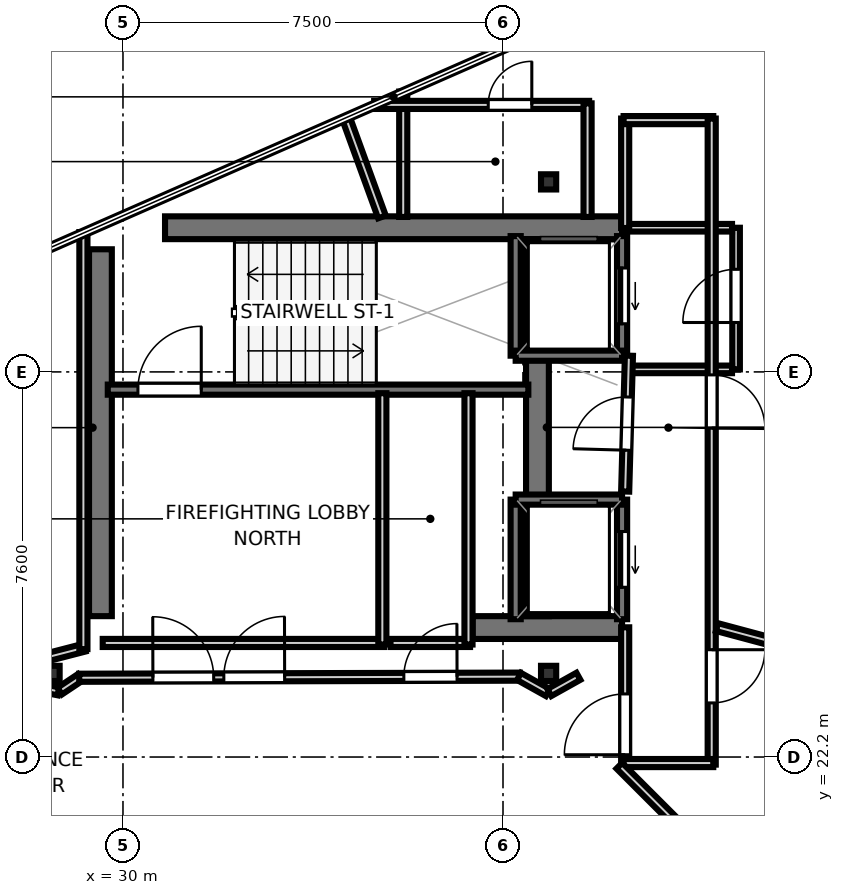
"""IFC4 building model, lengths in metres.
Left out: names, types, materials, properties, quantities, classifications, styles, units other than length and angle.
Written with IfcOpenShell. Run it as: python <this file> out.ifc"""

import sys

from ifc_helpers import new_model, si_unit, direction, frame, frame_2d, origin, origin_2d, place, context, subcontext, project, spatial, rectangle, i_section, extrude, element, fill, save


model = new_model("IFC4")
c1 = context("Model", 3, precision=1e-05, world=origin(), true_north=direction((0.0, 1.0)))
c2 = subcontext(c1, "Body", "Model", "MODEL_VIEW")
j1 = project(units=[si_unit("LENGTHUNIT", "METRE"), si_unit("PLANEANGLEUNIT", "RADIAN")], contexts=[c1])
p1 = place(None, origin())
s1 = spatial("IfcSite", under=j1, at=p1, CompositionType="ELEMENT")
p2 = place(p1, origin())
s2 = spatial("IfcBuilding", under=s1, at=p2, CompositionType="ELEMENT")
p3 = place(p2, frame((0.0, 0.0, 371.3)))
s3 = spatial("IfcBuildingStorey", under=s2, at=p3, CompositionType="ELEMENT", Elevation=371.3)
p4 = place(p3, frame((30.83, 32.645, 0.0), z_axis=(0.0, 0.0, 1.0), x_axis=(1.0, 0.0, 0.0)))
e1 = element("IfcWall", 1, at=p4, inside=s3, PredefinedType="SHEAR", context=c2, shape_type="SweptSolid", body=[
    extrude(rectangle(XDim=9.02, YDim=0.45, at=frame_2d((4.51, 0.0))), origin(), (0.0, 0.0, 1.0), 3.55),
])
p5 = place(p3, frame((36.9, 24.755, 0.0), z_axis=(0.0, 0.0, 1.0), x_axis=(1.0, 0.0, 0.0)))
e2 = element("IfcWall", 2, at=p5, inside=s3, PredefinedType="SHEAR", context=c2, shape_type="SweptSolid", body=[
    extrude(rectangle(XDim=2.95, YDim=0.45, at=frame_2d((1.475, 0.0))), origin(), (0.0, 0.0, 1.0), 3.55),
])
p6 = place(p3, frame((29.555, 24.98, 0.0), z_axis=(0.0, 0.0, 1.0), x_axis=(0.0, 1.0, 0.0)))
e3 = element("IfcWall", 3, at=p6, inside=s3, PredefinedType="SHEAR", context=c2, shape_type="SweptSolid", body=[
    extrude(rectangle(XDim=7.24, YDim=0.45, at=frame_2d((3.62, 0.0))), origin(), (0.0, 0.0, 1.0), 3.55),
])
p7 = place(p3, frame((38.18, 24.98, 0.0), z_axis=(0.0, 0.0, 1.0), x_axis=(0.0, 1.0, 0.0)))
e4 = element("IfcWall", 4, at=p7, inside=s3, PredefinedType="SHEAR", context=c2, shape_type="SweptSolid", body=[
    extrude(rectangle(XDim=7.44, YDim=0.45, at=frame_2d((3.72, 0.0))), origin(), (0.0, 0.0, 1.0), 3.55),
])
for number, where, z_axis, x_axis in (
    (5, (28.6, 23.85, 0.0), (0.0, 0.0, 1.0), (1.0, 0.0, 0.0)),
    (6, (38.4, 33.55, 0.0), (0.0, 0.0, 1.0), (1.0, 0.0, 0.0)),
    (7, (38.4, 23.85, 0.0), (0.0, 0.0, 1.0), (1.0, 0.0, 0.0)),
):
    element("IfcColumn", number, at=place(p3, frame(where, z_axis=z_axis, x_axis=x_axis)), inside=s3, PredefinedType="COLUMN", context=c2, shape_type="SweptSolid", body=[
        extrude(i_section(OverallWidth=0.3, OverallDepth=0.3, WebThickness=0.01, FlangeThickness=0.015, at=origin_2d()), origin(), (0.0, 0.0, 1.0), 3.75),
    ])
p8 = place(p3, frame((29.7, 29.45, 0.0), z_axis=(0.0, 0.0, 1.0), x_axis=(1.0, 0.0, 0.0)))
e8 = element("IfcWall", 8, at=p8, inside=s3, PredefinedType="SOLIDWALL", context=c2, shape_type="SweptSolid", body=[
    extrude(rectangle(XDim=8.3, YDim=0.2, at=frame_2d((4.15, 0.0))), origin(), (0.0, 0.0, 1.0), 3.55),
])
p9 = place(p8, frame((0.595, 0.0, 0.0)))
e9 = element("IfcOpeningElement", 9, at=p9, cuts=e8, PredefinedType="OPENING", context=c2, shape_type="SweptSolid", body=[
    extrude(rectangle(XDim=1.25, YDim=2.15, at=frame_2d((0.625, 1.075))), frame((0.0, 0.11, 0.0), z_axis=(0.0, -1.0, 0.0), x_axis=(1.0, 0.0, 0.0)), (0.0, 0.0, 1.0), 0.22),
])
p10 = place(p3, frame((39.85, 30.12, 0.0), z_axis=(0.0, 0.0, 1.0), x_axis=(0.0, 1.0, 0.0)))
e10 = element("IfcWall", 10, at=p10, inside=s3, PredefinedType="SOLIDWALL", context=c2, shape_type="SweptSolid", body=[
    extrude(rectangle(XDim=2.36, YDim=0.2, at=frame_2d((1.18, 0.0))), origin(), (0.0, 0.0, 1.0), 3.55),
])
p11 = place(p10, frame((0.63, 0.0, 0.0)))
e11 = element("IfcOpeningElement", 11, at=p11, cuts=e10, PredefinedType="OPENING", context=c2, shape_type="SweptSolid", body=[
    extrude(rectangle(XDim=1.1, YDim=2.15, at=frame_2d((0.55, 1.075))), frame((0.0, 0.11, 0.0), z_axis=(0.0, -1.0, 0.0), x_axis=(1.0, 0.0, 0.0)), (0.0, 0.0, 1.0), 0.22),
])
p12 = place(p3, frame((37.75, 30.12, 0.0), z_axis=(0.0, 0.0, 1.0), x_axis=(0.0, 1.0, 0.0)))
e12 = element("IfcWall", 12, at=p12, inside=s3, PredefinedType="SOLIDWALL", context=c2, shape_type="SweptSolid", body=[
    extrude(rectangle(XDim=2.36, YDim=0.2, at=frame_2d((1.18, 0.0))), origin(), (0.0, 0.0, 1.0), 3.55),
])
p13 = place(p3, frame((37.75, 30.12, 0.0), z_axis=(0.0, 0.0, 1.0), x_axis=(1.0, 0.0, 0.0)))
e13 = element("IfcWall", 13, at=p13, inside=s3, PredefinedType="SOLIDWALL", context=c2, shape_type="SweptSolid", body=[
    extrude(rectangle(XDim=2.1, YDim=0.2, at=frame_2d((1.05, 0.0))), origin(), (0.0, 0.0, 1.0), 3.55),
])
p14 = place(p3, frame((39.85, 24.92, 0.0), z_axis=(0.0, 0.0, 1.0), x_axis=(0.0, 1.0, 0.0)))
e14 = element("IfcWall", 14, at=p14, inside=s3, PredefinedType="SOLIDWALL", context=c2, shape_type="SweptSolid", body=[
    extrude(rectangle(XDim=2.36, YDim=0.2, at=frame_2d((1.18, 0.0))), origin(), (0.0, 0.0, 1.0), 3.55),
])
p15 = place(p14, frame((0.63, 0.0, 0.0)))
e15 = element("IfcOpeningElement", 15, at=p15, cuts=e14, PredefinedType="OPENING", context=c2, shape_type="SweptSolid", body=[
    extrude(rectangle(XDim=1.1, YDim=2.15, at=frame_2d((0.55, 1.075))), frame((0.0, 0.11, 0.0), z_axis=(0.0, -1.0, 0.0), x_axis=(1.0, 0.0, 0.0)), (0.0, 0.0, 1.0), 0.22),
])
p16 = place(p3, frame((37.75, 24.92, 0.0), z_axis=(0.0, 0.0, 1.0), x_axis=(0.0, 1.0, 0.0)))
e16 = element("IfcWall", 16, at=p16, inside=s3, PredefinedType="SOLIDWALL", context=c2, shape_type="SweptSolid", body=[
    extrude(rectangle(XDim=2.36, YDim=0.2, at=frame_2d((1.18, 0.0))), origin(), (0.0, 0.0, 1.0), 3.55),
])
p17 = place(p3, frame((37.75, 27.28, 0.0), z_axis=(0.0, 0.0, 1.0), x_axis=(1.0, 0.0, 0.0)))
e17 = element("IfcWall", 17, at=p17, inside=s3, PredefinedType="SOLIDWALL", context=c2, shape_type="SweptSolid", body=[
    extrude(rectangle(XDim=2.1, YDim=0.2, at=frame_2d((1.05, 0.0))), origin(), (0.0, 0.0, 1.0), 3.55),
])
p18 = place(p3, frame((42.1, 29.85, 0.0), z_axis=(0.0, 0.0, 1.0), x_axis=(0.0, 1.0, 0.0)))
e18 = element("IfcWall", 18, at=p18, inside=s3, PredefinedType="PARTITIONING", context=c2, shape_type="SweptSolid", body=[
    extrude(rectangle(XDim=2.795, YDim=0.15, at=frame_2d((1.397, 0.0))), origin(), (0.0, 0.0, 1.0), 2.87),
])
p19 = place(p18, frame((0.925, 0.0, 0.0)))
e19 = element("IfcOpeningElement", 19, at=p19, cuts=e18, PredefinedType="OPENING", context=c2, shape_type="SweptSolid", body=[
    extrude(rectangle(XDim=1.05, YDim=2.15, at=frame_2d((0.525, 1.075))), frame((0.0, 0.085, 0.0), z_axis=(0.0, -1.0, 0.0), x_axis=(1.0, 0.0, 0.0)), (0.0, 0.0, 1.0), 0.17),
])
for number, where, z_axis, x_axis in (
    (20, (39.96, 29.85, 0.0), (0.0, 0.0, 1.0), (1.0, 0.0, 0.0)),
    (21, (39.96, 32.645, 0.0), (0.0, 0.0, 1.0), (1.0, 0.0, 0.0)),
):
    element("IfcWall", number, at=place(p3, frame(where, z_axis=z_axis, x_axis=x_axis)), inside=s3, PredefinedType="PARTITIONING", context=c2, shape_type="SweptSolid", body=[
        extrude(rectangle(XDim=2.06, YDim=0.15, at=frame_2d((1.03, 0.0))), origin(), (0.0, 0.0, 1.0), 2.87),
    ])
p20 = place(p3, frame((35.15, 24.451, 0.0), z_axis=(0.0, 0.0, 1.0), x_axis=(-1.0, 0.0, 0.0)))
e22 = element("IfcWall", 22, at=p20, inside=s3, PredefinedType="PARTITIONING", context=c2, shape_type="SweptSolid", body=[
    extrude(rectangle(XDim=5.55, YDim=0.16, at=frame_2d((2.775, 0.0))), origin(), (0.0, 0.0, 1.0), 2.87),
])
p21 = place(p3, frame((35.119, 29.38, 0.0), z_axis=(0.0, 0.0, 1.0), x_axis=(0.0, -1.0, 0.0)))
e23 = element("IfcWall", 23, at=p21, inside=s3, PredefinedType="PARTITIONING", context=c2, shape_type="SweptSolid", body=[
    extrude(rectangle(XDim=4.96, YDim=0.16, at=frame_2d((2.48, 0.0))), origin(), (0.0, 0.0, 1.0), 2.08),
])
p22 = place(p3, frame((39.911, 22.05, 0.0), z_axis=(0.0, 0.0, 1.0), x_axis=(0.0, 1.0, 0.0)))
e24 = element("IfcWall", 24, at=p22, inside=s3, PredefinedType="PARTITIONING", context=c2, shape_type="SweptSolid", body=[
    extrude(rectangle(XDim=2.71, YDim=0.16, at=frame_2d((1.355, 0.0))), origin(), (0.0, 0.0, 1.0), 2.87),
])
p23 = place(p22, frame((0.195, 0.0, 0.0)))
e25 = element("IfcOpeningElement", 25, at=p23, cuts=e24, PredefinedType="OPENING", context=c2, shape_type="SweptSolid", body=[
    extrude(rectangle(XDim=1.2, YDim=2.15, at=frame_2d((0.6, 1.075))), frame((0.0, 0.09, 0.0), z_axis=(0.0, -1.0, 0.0), x_axis=(1.0, 0.0, 0.0)), (0.0, 0.0, 1.0), 0.18),
])
p24 = place(p3, frame((39.911, 27.439, 0.0), z_axis=(0.0, 0.0, 1.0), x_axis=(0.027673579092, 0.999617013171, 0.0)))
e26 = element("IfcWall", 26, at=p24, inside=s3, PredefinedType="PARTITIONING", context=c2, shape_type="SweptSolid", body=[
    extrude(rectangle(XDim=2.682, YDim=0.16, at=frame_2d((1.341, 0.0))), origin(), (0.0, 0.0, 1.0), 2.87),
])
p25 = place(p24, frame((0.816, 0.0, 0.0)))
e27 = element("IfcOpeningElement", 27, at=p25, cuts=e26, PredefinedType="OPENING", context=c2, shape_type="SweptSolid", body=[
    extrude(rectangle(XDim=1.05, YDim=2.15, at=frame_2d((0.525, 1.075))), frame((0.0, 0.09, 0.0), z_axis=(0.0, -1.0, 0.0), x_axis=(1.0, 0.0, 0.0)), (0.0, 0.0, 1.0), 0.18),
])
p26 = place(p3, frame((39.911, 32.64, 0.0), z_axis=(0.0, 0.0, 1.0), x_axis=(0.0, 1.0, 0.0)))
e28 = element("IfcWall", 28, at=p26, inside=s3, PredefinedType="PARTITIONING", context=c2, shape_type="SweptSolid", body=[
    extrude(rectangle(XDim=2.16, YDim=0.16, at=frame_2d((1.08, 0.0))), origin(), (0.0, 0.0, 1.0), 2.87),
])
p27 = place(p3, frame((39.88, 34.769, 0.0), z_axis=(0.0, 0.0, 1.0), x_axis=(1.0, 0.0, 0.0)))
e29 = element("IfcWall", 29, at=p27, inside=s3, PredefinedType="PARTITIONING", context=c2, shape_type="SweptSolid", body=[
    extrude(rectangle(XDim=1.77, YDim=0.16, at=frame_2d((0.885, 0.0))), origin(), (0.0, 0.0, 1.0), 2.87),
])
p28 = place(p3, frame((41.619, 34.8, 0.0), z_axis=(0.0, 0.0, 1.0), x_axis=(0.0, -1.0, 0.0)))
e30 = element("IfcWall", 30, at=p28, inside=s3, PredefinedType="PARTITIONING", context=c2, shape_type="SweptSolid", body=[
    extrude(rectangle(XDim=12.75, YDim=0.16, at=frame_2d((6.375, 0.0))), origin(), (0.0, 0.0, 1.0), 2.87),
])
p29 = place(p28, frame((10.482, 0.0, 0.0)))
e31 = element("IfcOpeningElement", 31, at=p29, cuts=e30, PredefinedType="OPENING", context=c2, shape_type="SweptSolid", body=[
    extrude(rectangle(XDim=1.05, YDim=2.15, at=frame_2d((0.525, 1.075))), frame((0.0, 0.09, 0.0), z_axis=(0.0, -1.0, 0.0), x_axis=(1.0, 0.0, 0.0)), (0.0, 0.0, 1.0), 0.18),
])
p30 = place(p28, frame((5.059, 0.0, 0.0)))
e32 = element("IfcOpeningElement", 32, at=p30, cuts=e30, PredefinedType="OPENING", context=c2, shape_type="SweptSolid", body=[
    extrude(rectangle(XDim=1.05, YDim=2.15, at=frame_2d((0.525, 1.075))), frame((0.0, 0.09, 0.0), z_axis=(0.0, -1.0, 0.0), x_axis=(1.0, 0.0, 0.0)), (0.0, 0.0, 1.0), 0.18),
])
p31 = place(p3, frame((41.65, 22.081, 0.0), z_axis=(0.0, 0.0, 1.0), x_axis=(-1.0, 0.0, 0.0)))
e33 = element("IfcWall", 33, at=p31, inside=s3, PredefinedType="PARTITIONING", context=c2, shape_type="SweptSolid", body=[
    extrude(rectangle(XDim=1.77, YDim=0.16, at=frame_2d((0.885, 0.0))), origin(), (0.0, 0.0, 1.0), 2.87),
])
p32 = place(p3, frame((36.85, 24.451, 0.0), z_axis=(0.0, 0.0, 1.0), x_axis=(-1.0, 0.0, 0.0)))
e34 = element("IfcWall", 34, at=p32, inside=s3, PredefinedType="PARTITIONING", context=c2, shape_type="SweptSolid", body=[
    extrude(rectangle(XDim=1.57, YDim=0.16, at=frame_2d((0.785, 0.0))), origin(), (0.0, 0.0, 1.0), 2.87),
])
p33 = place(p3, frame((36.819, 29.38, 0.0), z_axis=(0.0, 0.0, 1.0), x_axis=(0.0, -1.0, 0.0)))
e35 = element("IfcWall", 35, at=p33, inside=s3, PredefinedType="PARTITIONING", context=c2, shape_type="SweptSolid", body=[
    extrude(rectangle(XDim=4.96, YDim=0.16, at=frame_2d((2.48, 0.0))), origin(), (0.0, 0.0, 1.0), 2.87),
])
p34 = place(p3, frame((35.531, 32.858, 0.0), z_axis=(0.0, 0.0, 1.0), x_axis=(0.0, 1.0, 0.0)))
e36 = element("IfcWall", 36, at=p34, inside=s3, PredefinedType="PARTITIONING", context=c2, shape_type="SweptSolid", body=[
    extrude(rectangle(XDim=2.474, YDim=0.16, at=frame_2d((1.237, 0.0))), origin(), (0.0, 0.0, 1.0), 2.87),
])
p35 = place(p3, frame((34.957, 35.069, 0.0), z_axis=(0.0, 0.0, 1.0), x_axis=(1.0, 0.0, 0.0)))
e37 = element("IfcWall", 37, at=p35, inside=s3, PredefinedType="PARTITIONING", context=c2, shape_type="SweptSolid", body=[
    extrude(rectangle(XDim=4.243, YDim=0.16, at=frame_2d((2.121, 0.0))), origin(), (0.0, 0.0, 1.0), 2.87),
])
p36 = place(p35, frame((2.251, 0.0, 0.0)))
e38 = element("IfcOpeningElement", 38, at=p36, cuts=e37, PredefinedType="OPENING", context=c2, shape_type="SweptSolid", body=[
    extrude(rectangle(XDim=0.86, YDim=2.05, at=frame_2d((0.43, 1.025))), frame((0.0, 0.09, 0.0), z_axis=(0.0, -1.0, 0.0), x_axis=(1.0, 0.0, 0.0)), (0.0, 0.0, 1.0), 0.18),
])
p37 = place(p3, frame((39.169, 35.1, 0.0), z_axis=(0.0, 0.0, 1.0), x_axis=(0.0, -1.0, 0.0)))
e39 = element("IfcWall", 39, at=p37, inside=s3, PredefinedType="PARTITIONING", context=c2, shape_type="SweptSolid", body=[
    extrude(rectangle(XDim=2.242, YDim=0.16, at=frame_2d((1.121, 0.0))), origin(), (0.0, 0.0, 1.0), 2.87),
])
p38 = place(p3, frame((29.242, 24.359, 0.0), z_axis=(0.0, 0.0, 1.0), x_axis=(-0.968190928123, -0.250212563035, 0.0)))
e40 = element("IfcWall", 40, at=p38, inside=s3, PredefinedType="PARTITIONING", context=c2, shape_type="SweptSolid", body=[
    extrude(rectangle(XDim=0.927, YDim=0.16, at=frame_2d((0.463, 0.0))), origin(), (0.0, 0.0, 1.0), 2.87),
])
p39 = place(p3, frame((28.346, 23.572, 0.0), z_axis=(0.0, 0.0, 1.0), x_axis=(0.980749356168, -0.19527083852, 0.0)))
e41 = element("IfcWall", 41, at=p39, inside=s3, PredefinedType="PARTITIONING", context=c2, shape_type="SweptSolid", body=[
    extrude(rectangle(XDim=0.389, YDim=0.16, at=frame_2d((0.194, 0.0))), origin(), (0.0, 0.0, 1.0), 2.87),
])
p40 = place(p3, frame((28.751, 23.501, 0.0), z_axis=(0.0, 0.0, 1.0), x_axis=(0.831506528289, 0.555514980368, 0.0)))
e42 = element("IfcWall", 42, at=p40, inside=s3, PredefinedType="PARTITIONING", context=c2, shape_type="SweptSolid", body=[
    extrude(rectangle(XDim=0.484, YDim=0.16, at=frame_2d((0.242, 0.0))), origin(), (0.0, 0.0, 1.0), 2.87),
])
p41 = place(p3, frame((29.136, 23.764, 0.0), z_axis=(0.0, 0.0, 1.0), x_axis=(0.999996877471, 0.002499009437, 0.0)))
e43 = element("IfcWall", 43, at=p41, inside=s3, PredefinedType="PARTITIONING", context=c2, shape_type="SweptSolid", body=[
    extrude(rectangle(XDim=8.695, YDim=0.16, at=frame_2d((4.347, 0.0))), origin(), (0.0, 0.0, 1.0), 2.87),
])
p42 = place(p41, frame((2.854, 0.0, 0.0)))
e44 = element("IfcOpeningElement", 44, at=p42, cuts=e43, PredefinedType="OPENING", context=c2, shape_type="SweptSolid", body=[
    extrude(rectangle(XDim=1.2, YDim=2.15, at=frame_2d((0.6, 1.075))), frame((0.0, 0.09, 0.0), z_axis=(0.0, -1.0, 0.0), x_axis=(1.0, 0.0, 0.0)), (0.0, 0.0, 1.0), 0.18),
])
p43 = place(p41, frame((6.407, 0.0, 0.0)))
e45 = element("IfcOpeningElement", 45, at=p43, cuts=e43, PredefinedType="OPENING", context=c2, shape_type="SweptSolid", body=[
    extrude(rectangle(XDim=1.05, YDim=2.15, at=frame_2d((0.525, 1.075))), frame((0.0, 0.09, 0.0), z_axis=(0.0, -1.0, 0.0), x_axis=(1.0, 0.0, 0.0)), (0.0, 0.0, 1.0), 0.18),
])
p44 = place(p41, frame((1.454, 0.0, 0.0)))
e46 = element("IfcOpeningElement", 46, at=p44, cuts=e43, PredefinedType="OPENING", context=c2, shape_type="SweptSolid", body=[
    extrude(rectangle(XDim=1.2, YDim=2.15, at=frame_2d((0.6, 1.075))), frame((0.0, 0.09, 0.0), z_axis=(0.0, -1.0, 0.0), x_axis=(1.0, 0.0, 0.0)), (0.0, 0.0, 1.0), 0.18),
])
p45 = place(p3, frame((37.816, 23.79, 0.0), z_axis=(0.0, 0.0, 1.0), x_axis=(0.873431330758, -0.486947338478, 0.0)))
e47 = element("IfcWall", 47, at=p45, inside=s3, PredefinedType="PARTITIONING", context=c2, shape_type="SweptSolid", body=[
    extrude(rectangle(XDim=0.651, YDim=0.16, at=frame_2d((0.326, 0.0))), origin(), (0.0, 0.0, 1.0), 2.87),
])
p46 = place(p3, frame((38.415, 23.473, 0.0), z_axis=(0.0, 0.0, 1.0), x_axis=(0.873120406102, 0.487504621976, 0.0)))
e48 = element("IfcWall", 48, at=p46, inside=s3, PredefinedType="PARTITIONING", context=c2, shape_type="SweptSolid", body=[
    extrude(rectangle(XDim=0.656, YDim=0.16, at=frame_2d((0.328, 0.0))), origin(), (0.0, 0.0, 1.0), 2.87),
])
p47 = place(p3, frame((39.796, 22.028, 0.0), z_axis=(0.0, 0.0, 1.0), x_axis=(0.707106781187, -0.707106781187, 0.0)))
e49 = element("IfcWall", 49, at=p47, inside=s3, PredefinedType="PARTITIONING", context=c2, shape_type="SweptSolid", body=[
    extrude(rectangle(XDim=2.051, YDim=0.16, at=frame_2d((1.025, 0.0))), origin(), (0.0, 0.0, 1.0), 2.87),
])
p48 = place(p3, frame((29.219, 32.56, 0.0), z_axis=(0.0, 0.0, 1.0), x_axis=(0.0, -1.0, 0.0)))
e50 = element("IfcWall", 50, at=p48, inside=s3, PredefinedType="PARTITIONING", context=c2, shape_type="SweptSolid", body=[
    extrude(rectangle(XDim=8.23, YDim=0.16, at=frame_2d((4.115, 0.0))), origin(), (0.0, 0.0, 1.0), 2.87),
])
p49 = place(p3, frame((41.722, 24.764, 0.0), z_axis=(0.0, 0.0, 1.0), x_axis=(0.965929963901, -0.258803602832, 0.0)))
e51 = element("IfcWall", 51, at=p49, inside=s3, PredefinedType="PARTITIONING", context=c2, shape_type="SweptSolid", body=[
    extrude(rectangle(XDim=4.94, YDim=0.16, at=frame_2d((2.47, 0.0))), origin(), (0.0, 0.0, 1.0), 2.87),
])
p50 = place(p3, frame((35.111, 32.858, 0.0), z_axis=(0.0, 0.0, 1.0), x_axis=(-0.342060015432, 0.939678107568, 0.0)))
e52 = element("IfcWall", 52, at=p50, inside=s3, PredefinedType="PARTITIONING", context=c2, shape_type="SweptSolid", body=[
    extrude(rectangle(XDim=2.103, YDim=0.16, at=frame_2d((1.051, 0.0))), origin(), (0.0, 0.0, 1.0), 2.87),
])
p51 = place(p9, origin())
e53 = element("IfcDoor", 53, at=p51, inside=s3, OperationType="SINGLE_SWING_RIGHT", PredefinedType="DOOR", context=c2, shape_type="SweptSolid", body=[
    extrude(rectangle(XDim=1.25, YDim=2.15, at=frame_2d((0.625, 1.075))), frame((0.0, 0.025, 0.0), z_axis=(0.0, -1.0, 0.0), x_axis=(1.0, 0.0, 0.0)), (0.0, 0.0, 1.0), 0.05),
])
fill(e9, e53)
p52 = place(p11, origin())
e54 = element("IfcDoor", 54, at=p52, inside=s3, OperationType="SLIDING_TO_LEFT", PredefinedType="DOOR", context=c2, shape_type="SweptSolid", body=[
    extrude(rectangle(XDim=1.1, YDim=2.15, at=frame_2d((0.55, 1.075))), frame((0.0, 0.025, 0.0), z_axis=(0.0, -1.0, 0.0), x_axis=(1.0, 0.0, 0.0)), (0.0, 0.0, 1.0), 0.05),
])
fill(e11, e54)
p53 = place(p15, origin())
e55 = element("IfcDoor", 55, at=p53, inside=s3, OperationType="SLIDING_TO_LEFT", PredefinedType="DOOR", context=c2, shape_type="SweptSolid", body=[
    extrude(rectangle(XDim=1.1, YDim=2.15, at=frame_2d((0.55, 1.075))), frame((0.0, 0.025, 0.0), z_axis=(0.0, -1.0, 0.0), x_axis=(1.0, 0.0, 0.0)), (0.0, 0.0, 1.0), 0.05),
])
fill(e15, e55)
p54 = place(p19, origin())
e56 = element("IfcDoor", 56, at=p54, inside=s3, OperationType="SINGLE_SWING_LEFT", PredefinedType="DOOR", context=c2, shape_type="SweptSolid", body=[
    extrude(rectangle(XDim=1.05, YDim=2.15, at=frame_2d((0.525, 1.075))), frame((0.0, 0.025, 0.0), z_axis=(0.0, -1.0, 0.0), x_axis=(1.0, 0.0, 0.0)), (0.0, 0.0, 1.0), 0.05),
])
fill(e19, e56)
p55 = place(p42, origin())
e57 = element("IfcDoor", 57, at=p55, inside=s3, OperationType="SINGLE_SWING_RIGHT", PredefinedType="DOOR", context=c2, shape_type="SweptSolid", body=[
    extrude(rectangle(XDim=1.2, YDim=2.15, at=frame_2d((0.6, 1.075))), frame((0.0, 0.025, 0.0), z_axis=(0.0, -1.0, 0.0), x_axis=(1.0, 0.0, 0.0)), (0.0, 0.0, 1.0), 0.05),
])
fill(e44, e57)
p56 = place(p23, origin())
e58 = element("IfcDoor", 58, at=p56, inside=s3, OperationType="SINGLE_SWING_LEFT", PredefinedType="DOOR", context=c2, shape_type="SweptSolid", body=[
    extrude(rectangle(XDim=1.2, YDim=2.15, at=frame_2d((0.6, 1.075))), frame((0.0, 0.025, 0.0), z_axis=(0.0, -1.0, 0.0), x_axis=(1.0, 0.0, 0.0)), (0.0, 0.0, 1.0), 0.05),
])
fill(e25, e58)
p57 = place(p43, origin())
e59 = element("IfcDoor", 59, at=p57, inside=s3, OperationType="SINGLE_SWING_RIGHT", PredefinedType="DOOR", context=c2, shape_type="SweptSolid", body=[
    extrude(rectangle(XDim=1.05, YDim=2.15, at=frame_2d((0.525, 1.075))), frame((0.0, 0.025, 0.0), z_axis=(0.0, -1.0, 0.0), x_axis=(1.0, 0.0, 0.0)), (0.0, 0.0, 1.0), 0.05),
])
fill(e45, e59)
p58 = place(p44, origin())
e60 = element("IfcDoor", 60, at=p58, inside=s3, OperationType="SINGLE_SWING_LEFT", PredefinedType="DOOR", context=c2, shape_type="SweptSolid", body=[
    extrude(rectangle(XDim=1.2, YDim=2.15, at=frame_2d((0.6, 1.075))), frame((0.0, 0.025, 0.0), z_axis=(0.0, -1.0, 0.0), x_axis=(1.0, 0.0, 0.0)), (0.0, 0.0, 1.0), 0.05),
])
fill(e46, e60)
p59 = place(p29, origin())
e61 = element("IfcDoor", 61, at=p59, inside=s3, OperationType="SINGLE_SWING_LEFT", PredefinedType="DOOR", context=c2, shape_type="SweptSolid", body=[
    extrude(rectangle(XDim=1.05, YDim=2.15, at=frame_2d((0.525, 1.075))), frame((0.0, 0.025, 0.0), z_axis=(0.0, -1.0, 0.0), x_axis=(1.0, 0.0, 0.0)), (0.0, 0.0, 1.0), 0.05),
])
fill(e31, e61)
p60 = place(p30, origin())
e62 = element("IfcDoor", 62, at=p60, inside=s3, OperationType="SINGLE_SWING_RIGHT", PredefinedType="DOOR", context=c2, shape_type="SweptSolid", body=[
    extrude(rectangle(XDim=1.05, YDim=2.15, at=frame_2d((0.525, 1.075))), frame((0.0, 0.025, 0.0), z_axis=(0.0, -1.0, 0.0), x_axis=(1.0, 0.0, 0.0)), (0.0, 0.0, 1.0), 0.05),
])
fill(e32, e62)
p61 = place(p25, origin())
e63 = element("IfcDoor", 63, at=p61, inside=s3, OperationType="SINGLE_SWING_LEFT", PredefinedType="DOOR", context=c2, shape_type="SweptSolid", body=[
    extrude(rectangle(XDim=1.05, YDim=2.15, at=frame_2d((0.525, 1.075))), frame((0.0, 0.025, 0.0), z_axis=(0.0, -1.0, 0.0), x_axis=(1.0, 0.0, 0.0)), (0.0, 0.0, 1.0), 0.05),
])
fill(e27, e63)
p62 = place(p36, origin())
e64 = element("IfcDoor", 64, at=p62, inside=s3, OperationType="SINGLE_SWING_RIGHT", PredefinedType="DOOR", context=c2, shape_type="SweptSolid", body=[
    extrude(rectangle(XDim=0.86, YDim=2.05, at=frame_2d((0.43, 1.025))), frame((0.0, 0.025, 0.0), z_axis=(0.0, -1.0, 0.0), x_axis=(1.0, 0.0, 0.0)), (0.0, 0.0, 1.0), 0.05),
])
fill(e38, e64)
save(model, sys.argv[1])
